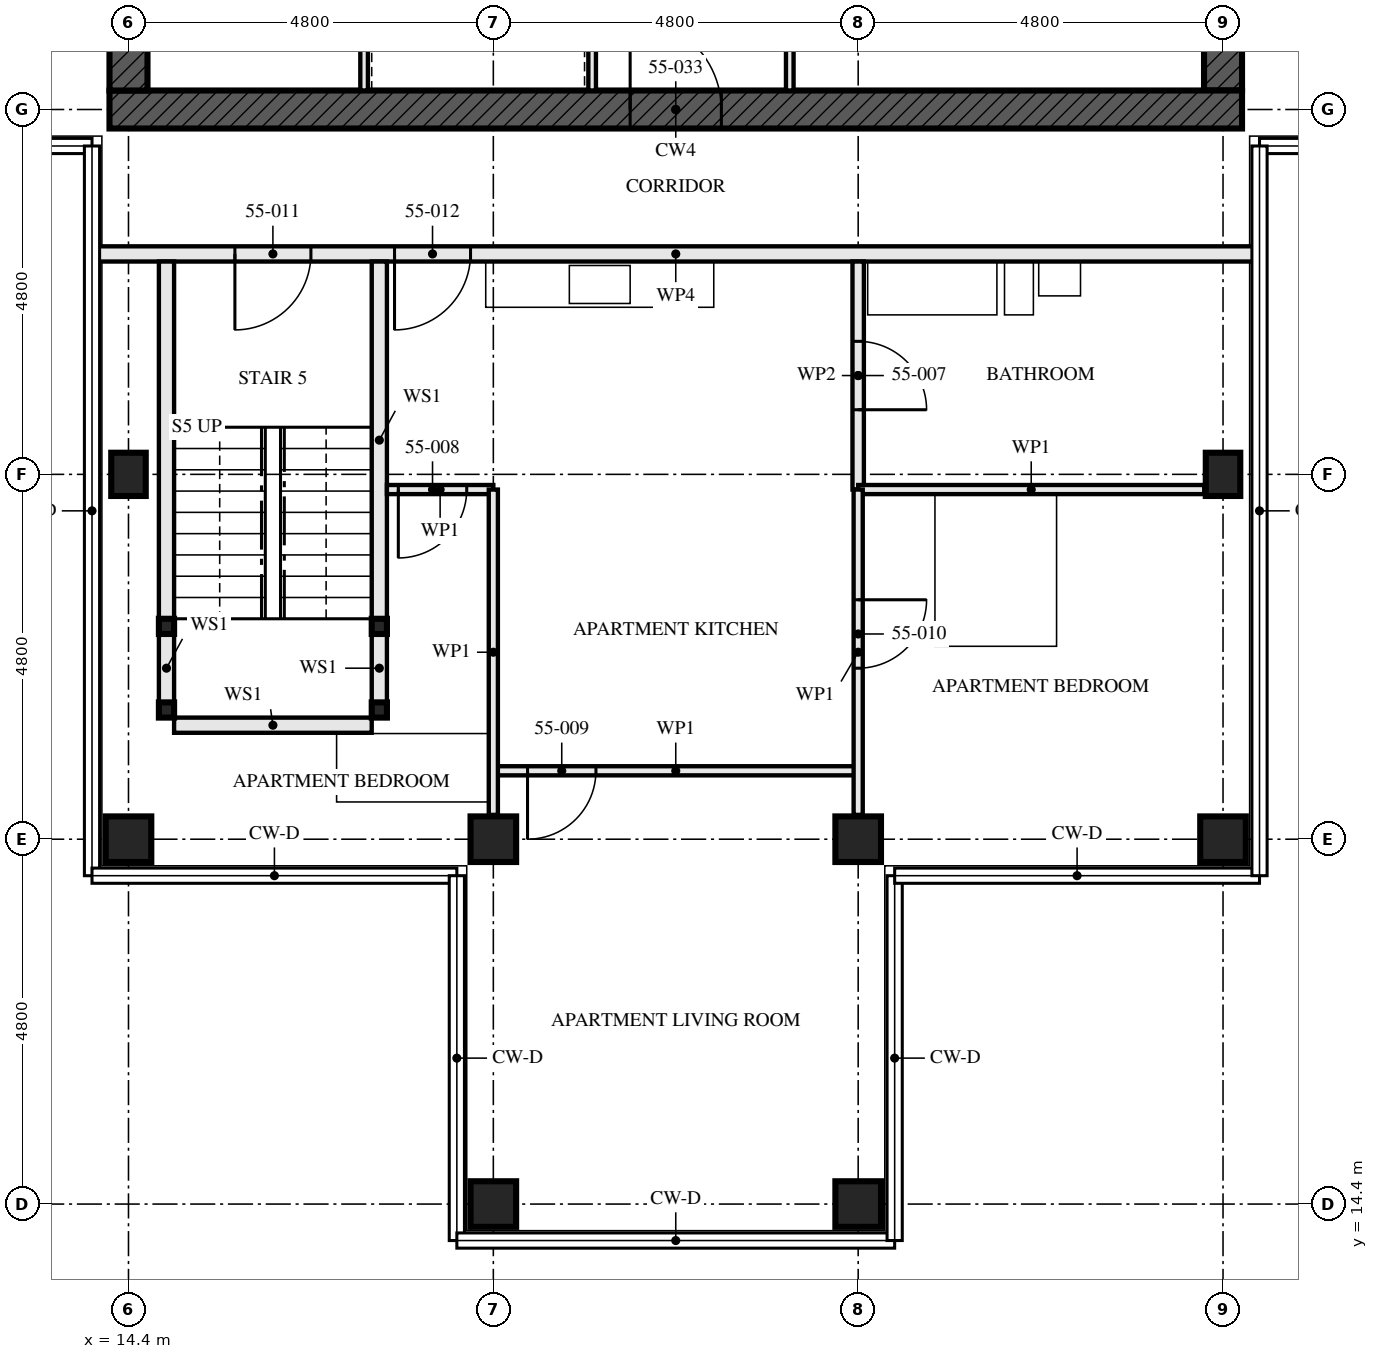
"""IFC4 building model, lengths in metres.
Left out: names, types, materials, properties, quantities, classifications, styles, units other than length and angle.
Written with IfcOpenShell. Run it as: python <this file> out.ifc"""

import sys

from ifc_helpers import new_model, si_unit, direction, frame, frame_2d, origin, origin_2d, place, context, subcontext, project, spatial, rectangle, hollow_rectangle, i_section, extrude, element, fill, save


model = new_model("IFC4")
c1 = context("Model", 3, precision=1e-05, world=origin(), true_north=direction((0.0, 1.0)))
c2 = subcontext(c1, "Body", "Model", "MODEL_VIEW")
j1 = project(units=[si_unit("LENGTHUNIT", "METRE"), si_unit("PLANEANGLEUNIT", "RADIAN")], contexts=[c1])
p1 = place(None, origin())
s1 = spatial("IfcSite", under=j1, at=p1, CompositionType="ELEMENT")
p2 = place(p1, origin())
s2 = spatial("IfcBuilding", under=s1, at=p2, CompositionType="ELEMENT")
p3 = place(p2, frame((0.0, 0.0, 201.5)))
s3 = spatial("IfcBuildingStorey", under=s2, at=p3, CompositionType="ELEMENT", Elevation=201.5)
p4 = place(p3, frame((14.4, 19.2, 0.0), z_axis=(0.0, 0.0, 1.0), x_axis=(0.0, 1.0, 0.0)))
e1 = element("IfcColumn", 1, at=p4, inside=s3, PredefinedType="COLUMN", context=c2, shape_type="SweptSolid", body=[
    extrude(hollow_rectangle(XDim=0.6, YDim=0.6, WallThickness=0.05, at=origin_2d()), origin(), (0.0, 0.0, 1.0), 3.5),
])
p5 = place(p3, frame((14.4, 24.0, 0.0), z_axis=(0.0, 0.0, 1.0), x_axis=(1.0, 0.0, 0.0)))
e2 = element("IfcColumn", 2, at=p5, inside=s3, PredefinedType="COLUMN", context=c2, shape_type="SweptSolid", body=[
    extrude(i_section(OverallWidth=0.454, OverallDepth=0.569, WebThickness=0.078, FlangeThickness=0.125, FilletRadius=0.015, at=origin_2d()), origin(), (0.0, 0.0, 1.0), 3.5),
])
for number, where, z_axis, x_axis in (
    (3, (19.2, 14.4, 0.0), (0.0, 0.0, 1.0), (0.0, 1.0, 0.0)),
    (4, (19.2, 19.2, 0.0), (0.0, 0.0, 1.0), (0.0, 1.0, 0.0)),
    (5, (24.0, 14.4, 0.0), (0.0, 0.0, 1.0), (0.0, 1.0, 0.0)),
    (6, (24.0, 19.2, 0.0), (0.0, 0.0, 1.0), (0.0, 1.0, 0.0)),
    (7, (28.8, 19.2, 0.0), (0.0, 0.0, 1.0), (0.0, 1.0, 0.0)),
):
    element("IfcColumn", number, at=place(p3, frame(where, z_axis=z_axis, x_axis=x_axis)), inside=s3, PredefinedType="COLUMN", context=c2, shape_type="SweptSolid", body=[
        extrude(hollow_rectangle(XDim=0.6, YDim=0.6, WallThickness=0.05, at=origin_2d()), origin(), (0.0, 0.0, 1.0), 3.5),
    ])
p6 = place(p3, frame((28.8, 24.0, 0.0), z_axis=(0.0, 0.0, 1.0), x_axis=(1.0, 0.0, 0.0)))
e8 = element("IfcColumn", 8, at=p6, inside=s3, PredefinedType="COLUMN", context=c2, shape_type="SweptSolid", body=[
    extrude(i_section(OverallWidth=0.454, OverallDepth=0.569, WebThickness=0.078, FlangeThickness=0.125, FilletRadius=0.015, at=origin_2d()), origin(), (0.0, 0.0, 1.0), 3.5),
])
p7 = place(p3, frame((14.15, 28.8, -0.17), z_axis=(0.0, 0.0, 1.0), x_axis=(1.0, 0.0, 0.0)))
e9 = element("IfcWall", 9, at=p7, inside=s3, PredefinedType="SHEAR", context=c2, shape_type="SweptSolid", body=[
    extrude(rectangle(XDim=14.9, YDim=0.5, at=frame_2d((7.45, 0.0))), origin(), (0.0, 0.0, 1.0), 3.5),
])
p8 = place(p7, frame((6.85, 0.0, 0.17)))
e10 = element("IfcOpeningElement", 10, at=p8, cuts=e9, PredefinedType="OPENING", context=c2, shape_type="SweptSolid", body=[
    extrude(rectangle(XDim=1.2, YDim=2.1, at=frame_2d((0.6, 1.05))), frame((0.0, 0.26, 0.0), z_axis=(0.0, -1.0, 0.0), x_axis=(1.0, 0.0, 0.0)), (0.0, 0.0, 1.0), 0.521),
])
p9 = place(p3, frame((14.4, 42.95, -0.17), z_axis=(0.0, 0.0, 1.0), x_axis=(0.0, -1.0, 0.0)))
e11 = element("IfcWall", 11, at=p9, inside=s3, PredefinedType="SHEAR", context=c2, shape_type="SweptSolid", body=[
    extrude(rectangle(XDim=13.9, YDim=0.5, at=frame_2d((6.95, 0.0))), origin(), (0.0, 0.0, 1.0), 3.5),
])
p10 = place(p9, frame((6.35, 0.0, 0.17)))
e12 = element("IfcOpeningElement", 12, at=p10, cuts=e11, PredefinedType="OPENING", context=c2, shape_type="SweptSolid", body=[
    extrude(rectangle(XDim=1.2, YDim=2.1, at=frame_2d((0.6, 1.05))), frame((0.0, 0.26, 0.0), z_axis=(0.0, -1.0, 0.0), x_axis=(1.0, 0.0, 0.0)), (0.0, 0.0, 1.0), 0.521),
])
p11 = place(p3, frame((28.8, 29.05, -0.17), z_axis=(0.0, 0.0, 1.0), x_axis=(0.0, 1.0, 0.0)))
e13 = element("IfcWall", 13, at=p11, inside=s3, PredefinedType="SHEAR", context=c2, shape_type="SweptSolid", body=[
    extrude(rectangle(XDim=13.9, YDim=0.5, at=frame_2d((6.95, 0.0))), origin(), (0.0, 0.0, 1.0), 3.5),
])
p12 = place(p11, frame((6.35, 0.0, 0.17)))
e14 = element("IfcOpeningElement", 14, at=p12, cuts=e13, PredefinedType="OPENING", context=c2, shape_type="SweptSolid", body=[
    extrude(rectangle(XDim=1.2, YDim=2.1, at=frame_2d((0.6, 1.05))), frame((0.0, 0.26, 0.0), z_axis=(0.0, -1.0, 0.0), x_axis=(1.0, 0.0, 0.0)), (0.0, 0.0, 1.0), 0.521),
])
for number, where, z_axis, x_axis in (
    (15, (14.9, 20.9, 0.0), (0.0, 0.0, 1.0), (1.0, 0.0, 0.0)),
    (16, (17.7, 20.9, 0.0), (0.0, 0.0, 1.0), (1.0, 0.0, 0.0)),
    (17, (14.9, 22.0, 0.0), (0.0, 0.0, 1.0), (1.0, 0.0, 0.0)),
    (18, (17.7, 22.0, 0.0), (0.0, 0.0, 1.0), (1.0, 0.0, 0.0)),
):
    element("IfcColumn", number, at=place(p3, frame(where, z_axis=z_axis, x_axis=x_axis)), inside=s3, PredefinedType="COLUMN", context=c2, shape_type="SweptSolid", body=[
        extrude(hollow_rectangle(XDim=0.2, YDim=0.2, WallThickness=0.008, at=origin_2d()), origin(), (0.0, 0.0, 1.0), 3.33),
    ])
p13 = place(p3, frame((14.9, 21.0, 0.0), z_axis=(0.0, 0.0, 1.0), x_axis=(0.0, 1.0, 0.0)))
e19 = element("IfcWall", 19, at=p13, inside=s3, PredefinedType="SOLIDWALL", context=c2, shape_type="SweptSolid", body=[
    extrude(rectangle(XDim=0.9, YDim=0.2, at=frame_2d((0.45, 0.0))), origin(), (0.0, 0.0, 1.0), 2.99),
])
p14 = place(p3, frame((14.9, 22.1, 0.0), z_axis=(0.0, 0.0, 1.0), x_axis=(0.0, 1.0, 0.0)))
e20 = element("IfcWall", 20, at=p14, inside=s3, PredefinedType="SOLIDWALL", context=c2, shape_type="SweptSolid", body=[
    extrude(rectangle(XDim=4.7, YDim=0.2, at=frame_2d((2.35, 0.0))), origin(), (0.0, 0.0, 1.0), 2.99),
])
p15 = place(p3, frame((17.7, 21.0, 0.0), z_axis=(0.0, 0.0, 1.0), x_axis=(0.0, 1.0, 0.0)))
e21 = element("IfcWall", 21, at=p15, inside=s3, PredefinedType="SOLIDWALL", context=c2, shape_type="SweptSolid", body=[
    extrude(rectangle(XDim=0.9, YDim=0.2, at=frame_2d((0.45, 0.0))), origin(), (0.0, 0.0, 1.0), 2.99),
])
p16 = place(p3, frame((17.7, 22.1, 0.0), z_axis=(0.0, 0.0, 1.0), x_axis=(0.0, 1.0, 0.0)))
e22 = element("IfcWall", 22, at=p16, inside=s3, PredefinedType="SOLIDWALL", context=c2, shape_type="SweptSolid", body=[
    extrude(rectangle(XDim=4.7, YDim=0.2, at=frame_2d((2.35, 0.0))), origin(), (0.0, 0.0, 1.0), 2.99),
])
p17 = place(p3, frame((15.0, 20.7, 0.0), z_axis=(0.0, 0.0, 1.0), x_axis=(1.0, 0.0, 0.0)))
e23 = element("IfcWall", 23, at=p17, inside=s3, PredefinedType="SOLIDWALL", context=c2, shape_type="SweptSolid", body=[
    extrude(rectangle(XDim=2.6, YDim=0.2, at=frame_2d((1.3, 0.0))), origin(), (0.0, 0.0, 1.0), 3.33),
])
p18 = place(p3, frame((24.0, 23.8, 0.0), z_axis=(0.0, 0.0, 1.0), x_axis=(0.0, 1.0, 0.0)))
e24 = element("IfcWall", 24, at=p18, inside=s3, PredefinedType="PARTITIONING", context=c2, shape_type="SweptSolid", body=[
    extrude(rectangle(XDim=3.0, YDim=0.15, at=frame_2d((1.5, 0.0))), origin(), (0.0, 0.0, 1.0), 2.55),
])
p19 = place(p18, frame((1.05, 0.0, 0.0)))
e25 = element("IfcOpeningElement", 25, at=p19, cuts=e24, PredefinedType="OPENING", context=c2, shape_type="SweptSolid", body=[
    extrude(rectangle(XDim=0.9, YDim=2.1, at=frame_2d((0.45, 1.05))), frame((0.0, 0.085, 0.0), z_axis=(0.0, -1.0, 0.0), x_axis=(1.0, 0.0, 0.0)), (0.0, 0.0, 1.0), 0.171),
])
p20 = place(p3, frame((17.8, 23.8, 0.0), z_axis=(0.0, 0.0, 1.0), x_axis=(1.0, 0.0, 0.0)))
e26 = element("IfcWall", 26, at=p20, inside=s3, PredefinedType="PARTITIONING", context=c2, shape_type="SweptSolid", body=[
    extrude(rectangle(XDim=1.4, YDim=0.12, at=frame_2d((0.7, 0.0))), origin(), (0.0, 0.0, 1.0), 3.33),
])
p21 = place(p20, frame((0.15, 0.0, 0.0)))
e27 = element("IfcOpeningElement", 27, at=p21, cuts=e26, PredefinedType="OPENING", context=c2, shape_type="SweptSolid", body=[
    extrude(rectangle(XDim=0.9, YDim=2.1, at=frame_2d((0.45, 1.05))), frame((0.0, 0.071, 0.0), z_axis=(0.0, -1.0, 0.0), x_axis=(1.0, 0.0, 0.0)), (0.0, 0.0, 1.0), 0.141),
])
p22 = place(p3, frame((19.2, 20.1, 0.0), z_axis=(0.0, 0.0, 1.0), x_axis=(1.0, 0.0, 0.0)))
e28 = element("IfcWall", 28, at=p22, inside=s3, PredefinedType="PARTITIONING", context=c2, shape_type="SweptSolid", body=[
    extrude(rectangle(XDim=4.8, YDim=0.12, at=frame_2d((2.4, 0.0))), origin(), (0.0, 0.0, 1.0), 3.33),
])
p23 = place(p22, frame((0.45, 0.0, 0.0)))
e29 = element("IfcOpeningElement", 29, at=p23, cuts=e28, PredefinedType="OPENING", context=c2, shape_type="SweptSolid", body=[
    extrude(rectangle(XDim=0.9, YDim=2.1, at=frame_2d((0.45, 1.05))), frame((0.0, 0.071, 0.0), z_axis=(0.0, -1.0, 0.0), x_axis=(1.0, 0.0, 0.0)), (0.0, 0.0, 1.0), 0.141),
])
p24 = place(p3, frame((24.0, 23.8, 0.0), z_axis=(0.0, 0.0, 1.0), x_axis=(1.0, 0.0, 0.0)))
e30 = element("IfcWall", 30, at=p24, inside=s3, PredefinedType="PARTITIONING", context=c2, shape_type="SweptSolid", body=[
    extrude(rectangle(XDim=4.553, YDim=0.12, at=frame_2d((2.276, 0.0))), origin(), (0.0, 0.0, 1.0), 3.33),
])
p25 = place(p3, frame((19.2, 19.52, 0.0), z_axis=(0.0, 0.0, 1.0), x_axis=(0.0, 1.0, 0.0)))
e31 = element("IfcWall", 31, at=p25, inside=s3, PredefinedType="PARTITIONING", context=c2, shape_type="SweptSolid", body=[
    extrude(rectangle(XDim=4.28, YDim=0.12, at=frame_2d((2.14, 0.0))), origin(), (0.0, 0.0, 1.0), 2.55),
])
p26 = place(p3, frame((24.0, 19.52, 0.0), z_axis=(0.0, 0.0, 1.0), x_axis=(0.0, 1.0, 0.0)))
e32 = element("IfcWall", 32, at=p26, inside=s3, PredefinedType="PARTITIONING", context=c2, shape_type="SweptSolid", body=[
    extrude(rectangle(XDim=4.28, YDim=0.12, at=frame_2d((2.14, 0.0))), origin(), (0.0, 0.0, 1.0), 3.33),
])
p27 = place(p26, frame((1.93, 0.0, 0.0)))
e33 = element("IfcOpeningElement", 33, at=p27, cuts=e32, PredefinedType="OPENING", context=c2, shape_type="SweptSolid", body=[
    extrude(rectangle(XDim=0.9, YDim=2.1, at=frame_2d((0.45, 1.05))), frame((0.0, 0.071, 0.0), z_axis=(0.0, -1.0, 0.0), x_axis=(1.0, 0.0, 0.0)), (0.0, 0.0, 1.0), 0.141),
])
p28 = place(p3, frame((13.945, 26.9, 0.0), z_axis=(0.0, 0.0, 1.0), x_axis=(1.0, 0.0, 0.0)))
e34 = element("IfcWall", 34, at=p28, inside=s3, PredefinedType="PARTITIONING", context=c2, shape_type="SweptSolid", body=[
    extrude(rectangle(XDim=15.31, YDim=0.2, at=frame_2d((7.655, 0.0))), origin(), (0.0, 0.0, 1.0), 2.32),
])
p29 = place(p28, frame((1.855, 0.0, 0.0)))
e35 = element("IfcOpeningElement", 35, at=p29, cuts=e34, PredefinedType="OPENING", context=c2, shape_type="SweptSolid", body=[
    extrude(rectangle(XDim=1.0, YDim=2.1, at=frame_2d((0.5, 1.05))), frame((0.0, 0.111, 0.0), z_axis=(0.0, -1.0, 0.0), x_axis=(1.0, 0.0, 0.0)), (0.0, 0.0, 1.0), 0.221),
])
p30 = place(p28, frame((3.955, 0.0, 0.0)))
e36 = element("IfcOpeningElement", 36, at=p30, cuts=e34, PredefinedType="OPENING", context=c2, shape_type="SweptSolid", body=[
    extrude(rectangle(XDim=1.0, YDim=2.1, at=frame_2d((0.5, 1.05))), frame((0.0, 0.111, 0.0), z_axis=(0.0, -1.0, 0.0), x_axis=(1.0, 0.0, 0.0)), (0.0, 0.0, 1.0), 0.221),
])
p31 = place(p3, frame((20.5, 29.05, 0.0), z_axis=(0.0, 0.0, 1.0), x_axis=(0.0, 1.0, 0.0)))
e37 = element("IfcWall", 37, at=p31, inside=s3, PredefinedType="SOLIDWALL", context=c2, shape_type="SweptSolid", body=[
    extrude(rectangle(XDim=5.8, YDim=0.1, at=frame_2d((2.9, 0.0))), origin(), (0.0, 0.0, 1.0), 3.33),
])
p32 = place(p31, frame((0.8, 0.0, 0.0)))
e38 = element("IfcOpeningElement", 38, at=p32, cuts=e37, PredefinedType="OPENING", context=c2, shape_type="SweptSolid", body=[
    extrude(rectangle(XDim=1.1, YDim=2.3, at=frame_2d((0.55, 1.15))), frame((0.0, 0.061, 0.0), z_axis=(0.0, -1.0, 0.0), x_axis=(1.0, 0.0, 0.0)), (0.0, 0.0, 1.0), 0.121),
])
p33 = place(p31, frame((3.775, 0.0, 0.0)))
e39 = element("IfcOpeningElement", 39, at=p33, cuts=e37, PredefinedType="OPENING", context=c2, shape_type="SweptSolid", body=[
    extrude(rectangle(XDim=1.1, YDim=2.3, at=frame_2d((0.55, 1.15))), frame((0.0, 0.061, 0.0), z_axis=(0.0, -1.0, 0.0), x_axis=(1.0, 0.0, 0.0)), (0.0, 0.0, 1.0), 0.121),
])
p34 = place(p3, frame((23.1, 29.05, 0.0), z_axis=(0.0, 0.0, 1.0), x_axis=(0.0, 1.0, 0.0)))
e40 = element("IfcWall", 40, at=p34, inside=s3, PredefinedType="SOLIDWALL", context=c2, shape_type="SweptSolid", body=[
    extrude(rectangle(XDim=5.8, YDim=0.1, at=frame_2d((2.9, 0.0))), origin(), (0.0, 0.0, 1.0), 3.33),
])
p35 = place(p34, frame((1.0, 0.0, 0.0)))
e41 = element("IfcOpeningElement", 41, at=p35, cuts=e40, PredefinedType="OPENING", context=c2, shape_type="SweptSolid", body=[
    extrude(rectangle(XDim=0.7, YDim=2.1, at=frame_2d((0.35, 1.05))), frame((0.0, 0.061, 0.0), z_axis=(0.0, -1.0, 0.0), x_axis=(1.0, 0.0, 0.0)), (0.0, 0.0, 1.0), 0.121),
])
p36 = place(p3, frame((17.5, 29.05, 0.0), z_axis=(0.0, 0.0, 1.0), x_axis=(0.0, 1.0, 0.0)))
e42 = element("IfcWall", 42, at=p36, inside=s3, PredefinedType="SOLIDWALL", context=c2, shape_type="SweptSolid", body=[
    extrude(rectangle(XDim=5.8, YDim=0.1, at=frame_2d((2.9, 0.0))), origin(), (0.0, 0.0, 1.0), 3.33),
])
p37 = place(p19, frame((0.9, 0.0, 0.0), z_axis=(0.0, 0.0, 1.0), x_axis=(-1.0, 0.0, 0.0)))
e43 = element("IfcDoor", 43, at=p37, inside=s3, OperationType="SINGLE_SWING_LEFT", PredefinedType="DOOR", context=c2, shape_type="SweptSolid", body=[
    extrude(rectangle(XDim=0.9, YDim=2.1, at=frame_2d((0.45, 1.05))), frame((0.0, 0.022, 0.0), z_axis=(0.0, -1.0, 0.0), x_axis=(1.0, 0.0, 0.0)), (0.0, 0.0, 1.0), 0.044),
])
fill(e25, e43)
p38 = place(p21, frame((0.9, 0.0, 0.0), z_axis=(0.0, 0.0, 1.0), x_axis=(-1.0, 0.0, 0.0)))
e44 = element("IfcDoor", 44, at=p38, inside=s3, OperationType="SINGLE_SWING_LEFT", PredefinedType="DOOR", context=c2, shape_type="SweptSolid", body=[
    extrude(rectangle(XDim=0.9, YDim=2.1, at=frame_2d((0.45, 1.05))), frame((0.0, 0.022, 0.0), z_axis=(0.0, -1.0, 0.0), x_axis=(1.0, 0.0, 0.0)), (0.0, 0.0, 1.0), 0.044),
])
fill(e27, e44)
p39 = place(p23, frame((0.9, 0.0, 0.0), z_axis=(0.0, 0.0, 1.0), x_axis=(-1.0, 0.0, 0.0)))
e45 = element("IfcDoor", 45, at=p39, inside=s3, OperationType="SINGLE_SWING_LEFT", PredefinedType="DOOR", context=c2, shape_type="SweptSolid", body=[
    extrude(rectangle(XDim=0.9, YDim=2.1, at=frame_2d((0.45, 1.05))), frame((0.0, 0.022, 0.0), z_axis=(0.0, -1.0, 0.0), x_axis=(1.0, 0.0, 0.0)), (0.0, 0.0, 1.0), 0.044),
])
fill(e29, e45)
p40 = place(p27, frame((0.9, 0.0, 0.0), z_axis=(0.0, 0.0, 1.0), x_axis=(-1.0, 0.0, 0.0)))
e46 = element("IfcDoor", 46, at=p40, inside=s3, OperationType="SINGLE_SWING_RIGHT", PredefinedType="DOOR", context=c2, shape_type="SweptSolid", body=[
    extrude(rectangle(XDim=0.9, YDim=2.1, at=frame_2d((0.45, 1.05))), frame((0.0, 0.022, 0.0), z_axis=(0.0, -1.0, 0.0), x_axis=(1.0, 0.0, 0.0)), (0.0, 0.0, 1.0), 0.044),
])
fill(e33, e46)
p41 = place(p29, frame((1.0, 0.0, 0.0), z_axis=(0.0, 0.0, 1.0), x_axis=(-1.0, 0.0, 0.0)))
e47 = element("IfcDoor", 47, at=p41, inside=s3, OperationType="SINGLE_SWING_LEFT", PredefinedType="DOOR", context=c2, shape_type="SweptSolid", body=[
    extrude(rectangle(XDim=1.0, YDim=2.1, at=frame_2d((0.5, 1.05))), frame((0.0, 0.032, 0.0), z_axis=(0.0, -1.0, 0.0), x_axis=(1.0, 0.0, 0.0)), (0.0, 0.0, 1.0), 0.064),
])
fill(e35, e47)
p42 = place(p30, frame((1.0, 0.0, 0.0), z_axis=(0.0, 0.0, 1.0), x_axis=(-1.0, 0.0, 0.0)))
e48 = element("IfcDoor", 48, at=p42, inside=s3, OperationType="SINGLE_SWING_LEFT", PredefinedType="DOOR", context=c2, shape_type="SweptSolid", body=[
    extrude(rectangle(XDim=1.0, YDim=2.1, at=frame_2d((0.5, 1.05))), frame((0.0, 0.027, 0.0), z_axis=(0.0, -1.0, 0.0), x_axis=(1.0, 0.0, 0.0)), (0.0, 0.0, 1.0), 0.054),
])
fill(e36, e48)
p43 = place(p8, origin())
e49 = element("IfcDoor", 49, at=p43, inside=s3, OperationType="SINGLE_SWING_LEFT", PredefinedType="DOOR", context=c2, shape_type="SweptSolid", body=[
    extrude(rectangle(XDim=1.2, YDim=2.1, at=frame_2d((0.6, 1.05))), frame((0.0, 0.027, 0.0), z_axis=(0.0, -1.0, 0.0), x_axis=(1.0, 0.0, 0.0)), (0.0, 0.0, 1.0), 0.054),
])
fill(e10, e49)
save(model, sys.argv[1])
